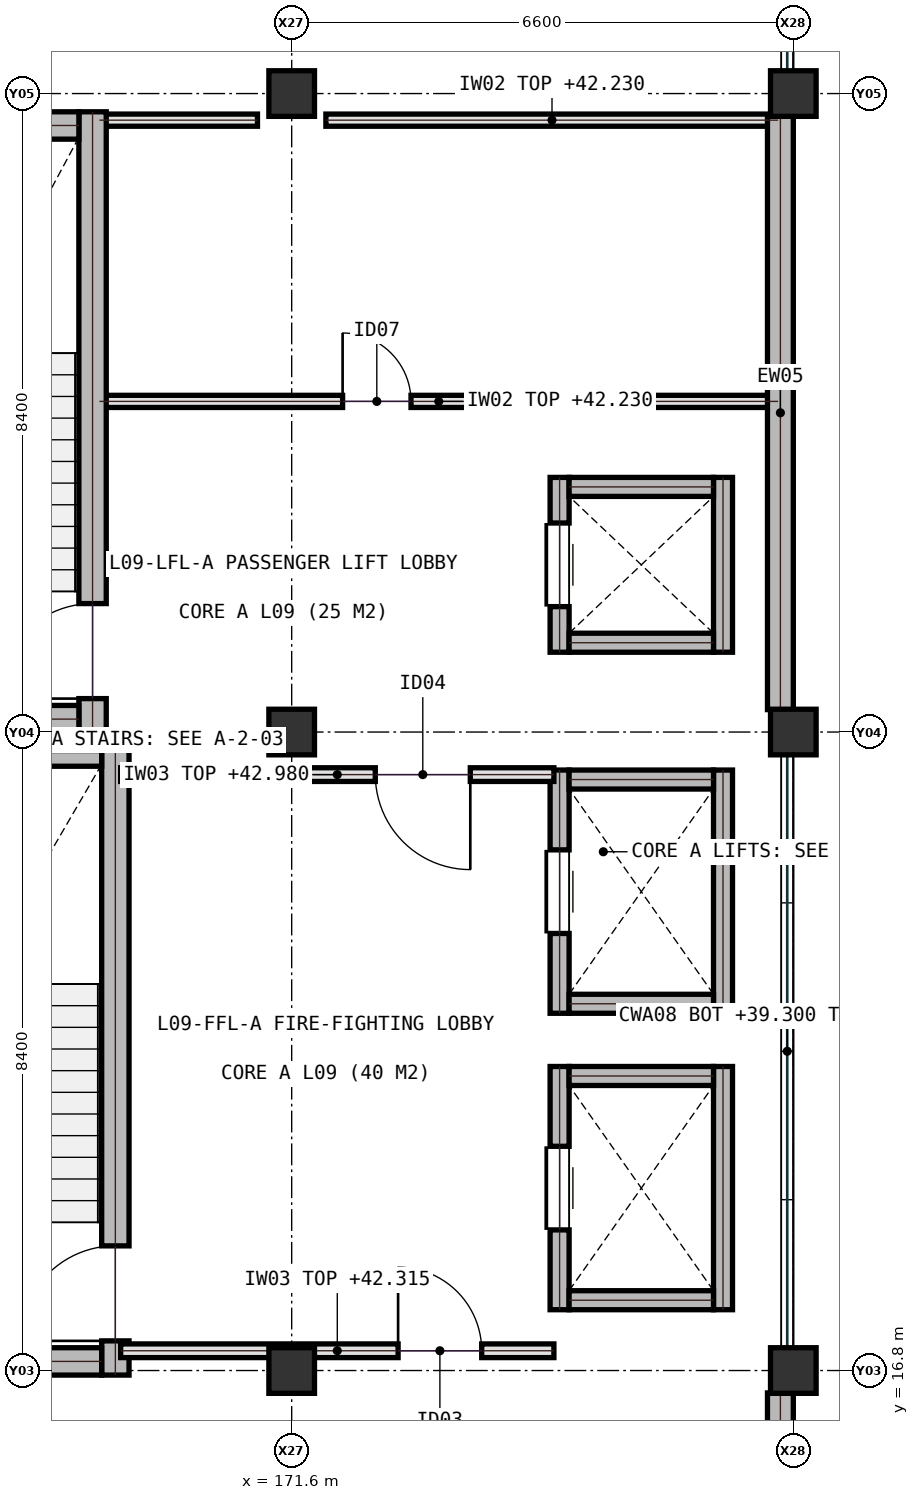
"""IFC4 building model, lengths in metres.
Left out: names, types, materials, properties, quantities, classifications, styles, units other than length and angle.
Written with IfcOpenShell. Run it as: python <this file> out.ifc"""

import sys

from ifc_helpers import new_model, si_unit, direction, frame, frame_2d, origin, origin_2d, place, context, subcontext, project, spatial, rectangle, extrude, element, fill, save


model = new_model("IFC4")
c1 = context("Model", 3, precision=1e-05, world=origin(), true_north=direction((0.0, 1.0)))
c2 = subcontext(c1, "Body", "Model", "MODEL_VIEW")
j1 = project(units=[si_unit("LENGTHUNIT", "METRE"), si_unit("PLANEANGLEUNIT", "RADIAN")], contexts=[c1])
p1 = place(None, origin())
s1 = spatial("IfcSite", under=j1, at=p1, CompositionType="ELEMENT")
p2 = place(p1, origin())
s2 = spatial("IfcBuilding", under=s1, at=p2, CompositionType="ELEMENT")
p3 = place(p2, frame((0.0, 0.0, 39.3)))
s3 = spatial("IfcBuildingStorey", under=s2, at=p3, CompositionType="ELEMENT", Elevation=39.3)
for number, where, z_axis, x_axis in (
    (1, (171.6, 16.8, 0.0), (0.0, 0.0, 1.0), (1.0, 0.0, 0.0)),
    (2, (171.6, 25.2, 0.0), (0.0, 0.0, 1.0), (1.0, 0.0, 0.0)),
    (3, (171.6, 33.6, 0.0), (0.0, 0.0, 1.0), (1.0, 0.0, 0.0)),
    (4, (178.2, 16.8, 0.0), (0.0, 0.0, 1.0), (1.0, 0.0, 0.0)),
    (5, (178.2, 25.2, 0.0), (0.0, 0.0, 1.0), (1.0, 0.0, 0.0)),
    (6, (178.2, 33.6, 0.0), (0.0, 0.0, 1.0), (1.0, 0.0, 0.0)),
):
    element("IfcColumn", number, at=place(p3, frame(where, z_axis=z_axis, x_axis=x_axis)), inside=s3, PredefinedType="COLUMN", context=c2, shape_type="SweptSolid", body=[
        extrude(rectangle(XDim=0.6, YDim=0.6, at=origin_2d()), origin(), (0.0, 0.0, 1.0), 3.9),
    ])
p4 = place(p3, frame((169.07, 29.55, 0.0), z_axis=(0.0, 0.0, 1.0), x_axis=(1.0, 0.0, 0.0)))
e7 = element("IfcWall", 7, at=p4, inside=s3, PredefinedType="PARTITIONING", context=c2, shape_type="SweptSolid", body=[
    extrude(rectangle(XDim=8.93, YDim=0.16, at=frame_2d((4.465, 0.0))), origin(), (0.0, 0.0, 1.0), 2.93),
])
p5 = place(p4, frame((3.2, 0.0, 0.0)))
e8 = element("IfcOpeningElement", 8, at=p5, cuts=e7, PredefinedType="OPENING", context=c2, shape_type="SweptSolid", body=[
    extrude(rectangle(XDim=0.9, YDim=2.1, at=frame_2d((0.45, 1.05))), frame((0.0, 0.09, 0.0), z_axis=(0.0, -1.0, 0.0), x_axis=(1.0, 0.0, 0.0)), (0.0, 0.0, 1.0), 0.18),
])
p6 = place(p3, frame((169.07, 33.25, 0.0), z_axis=(0.0, 0.0, 1.0), x_axis=(1.0, 0.0, 0.0)))
e9 = element("IfcWall", 9, at=p6, inside=s3, PredefinedType="PARTITIONING", context=c2, shape_type="SweptSolid", body=[
    extrude(rectangle(XDim=2.08, YDim=0.16, at=frame_2d((1.04, 0.0))), origin(), (0.0, 0.0, 1.0), 2.93),
])
p7 = place(p3, frame((172.05, 33.25, 0.0), z_axis=(0.0, 0.0, 1.0), x_axis=(1.0, 0.0, 0.0)))
e10 = element("IfcWall", 10, at=p7, inside=s3, PredefinedType="PARTITIONING", context=c2, shape_type="SweptSolid", body=[
    extrude(rectangle(XDim=5.95, YDim=0.16, at=frame_2d((2.975, 0.0))), origin(), (0.0, 0.0, 1.0), 2.93),
])
for number, where, z_axis, x_axis in (
    (11, (178.03, 8.695, 0.0), (0.0, 0.0, 1.0), (0.0, 1.0, 0.0)),
    (12, (178.03, 25.495, 0.0), (0.0, 0.0, 1.0), (0.0, 1.0, 0.0)),
):
    element("IfcWall", number, at=place(p3, frame(where, z_axis=z_axis, x_axis=x_axis)), inside=s3, PredefinedType="SHEAR", context=c2, shape_type="SweptSolid", body=[
        extrude(rectangle(XDim=7.81, YDim=0.34, at=frame_2d((3.905, 0.0))), origin(), (0.0, 0.0, 1.0), 3.68),
    ])
p8 = place(p3, frame((169.28, 16.74, 0.0), z_axis=(0.0, 0.0, 1.0), x_axis=(0.0, 1.0, 0.0)))
e13 = element("IfcWall", 13, at=p8, inside=s3, PredefinedType="SHEAR", context=c2, shape_type="SweptSolid", body=[
    extrude(rectangle(XDim=8.37, YDim=0.36, at=frame_2d((4.185, 0.0))), origin(), (0.0, 0.0, 1.0), 3.68),
])
p9 = place(p8, frame((0.45, 0.0, 0.0)))
e14 = element("IfcOpeningElement", 14, at=p9, cuts=e13, PredefinedType="OPENING", context=c2, shape_type="SweptSolid", body=[
    extrude(rectangle(XDim=1.25, YDim=2.15, at=frame_2d((0.625, 1.075))), frame((0.0, 0.19, 0.0), z_axis=(0.0, -1.0, 0.0), x_axis=(1.0, 0.0, 0.0)), (0.0, 0.0, 1.0), 0.38),
])
for number, where, z_axis, x_axis in (
    (15, (165.6, 24.93, 0.0), (0.0, 0.0, 1.0), (1.0, 0.0, 0.0)),
    (16, (165.6, 16.92, 0.0), (0.0, 0.0, 1.0), (1.0, 0.0, 0.0)),
):
    element("IfcWall", number, at=place(p3, frame(where, z_axis=z_axis, x_axis=x_axis)), inside=s3, PredefinedType="SHEAR", context=c2, shape_type="SweptSolid", body=[
        extrude(rectangle(XDim=3.5, YDim=0.36, at=frame_2d((1.75, 0.0))), origin(), (0.0, 0.0, 1.0), 3.68),
    ])
p10 = place(p3, frame((168.98, 25.19, 0.0), z_axis=(0.0, 0.0, 1.0), x_axis=(0.0, 1.0, 0.0)))
e17 = element("IfcWall", 17, at=p10, inside=s3, PredefinedType="SHEAR", context=c2, shape_type="SweptSolid", body=[
    extrude(rectangle(XDim=8.17, YDim=0.36, at=frame_2d((4.085, 0.0))), origin(), (0.0, 0.0, 1.0), 3.68),
])
p11 = place(p10, frame((0.45, 0.0, 0.0)))
e18 = element("IfcOpeningElement", 18, at=p11, cuts=e17, PredefinedType="OPENING", context=c2, shape_type="SweptSolid", body=[
    extrude(rectangle(XDim=1.25, YDim=2.15, at=frame_2d((0.625, 1.075))), frame((0.0, 0.19, 0.0), z_axis=(0.0, -1.0, 0.0), x_axis=(1.0, 0.0, 0.0)), (0.0, 0.0, 1.0), 0.38),
])
for number, where, z_axis, x_axis in (
    (19, (165.6, 33.18, 0.0), (0.0, 0.0, 1.0), (1.0, 0.0, 0.0)),
    (20, (165.6, 25.37, 0.0), (0.0, 0.0, 1.0), (1.0, 0.0, 0.0)),
):
    element("IfcWall", number, at=place(p3, frame(where, z_axis=z_axis, x_axis=x_axis)), inside=s3, PredefinedType="SHEAR", context=c2, shape_type="SweptSolid", body=[
        extrude(rectangle(XDim=3.2, YDim=0.36, at=frame_2d((1.6, 0.0))), origin(), (0.0, 0.0, 1.0), 3.68),
    ])
p12 = place(p3, frame((175.125, 17.6, 0.0), z_axis=(0.0, 0.0, 1.0), x_axis=(0.0, 1.0, 0.0)))
e21 = element("IfcWall", 21, at=p12, inside=s3, PredefinedType="SHEAR", context=c2, shape_type="SweptSolid", body=[
    extrude(rectangle(XDim=3.2, YDim=0.25, at=frame_2d((1.6, 0.0))), origin(), (0.0, 0.0, 1.0), 3.68),
])
p13 = place(p12, frame((1.05, 0.0, 0.0)))
e22 = element("IfcOpeningElement", 22, at=p13, cuts=e21, PredefinedType="OPENING", context=c2, shape_type="SweptSolid", body=[
    extrude(rectangle(XDim=1.1, YDim=2.15, at=frame_2d((0.55, 1.075))), frame((0.0, 0.135, 0.0), z_axis=(0.0, -1.0, 0.0), x_axis=(1.0, 0.0, 0.0)), (0.0, 0.0, 1.0), 0.27),
])
p14 = place(p3, frame((177.275, 17.6, 0.0), z_axis=(0.0, 0.0, 1.0), x_axis=(0.0, 1.0, 0.0)))
e23 = element("IfcWall", 23, at=p14, inside=s3, PredefinedType="SHEAR", context=c2, shape_type="SweptSolid", body=[
    extrude(rectangle(XDim=3.2, YDim=0.25, at=frame_2d((1.6, 0.0))), origin(), (0.0, 0.0, 1.0), 3.68),
])
for number, where, z_axis, x_axis in (
    (24, (175.25, 17.725, 0.0), (0.0, 0.0, 1.0), (1.0, 0.0, 0.0)),
    (25, (175.25, 20.675, 0.0), (0.0, 0.0, 1.0), (1.0, 0.0, 0.0)),
):
    element("IfcWall", number, at=place(p3, frame(where, z_axis=z_axis, x_axis=x_axis)), inside=s3, PredefinedType="SHEAR", context=c2, shape_type="SweptSolid", body=[
        extrude(rectangle(XDim=1.9, YDim=0.25, at=frame_2d((0.95, 0.0))), origin(), (0.0, 0.0, 1.0), 3.68),
    ])
p15 = place(p3, frame((175.125, 21.5, 0.0), z_axis=(0.0, 0.0, 1.0), x_axis=(0.0, 1.0, 0.0)))
e26 = element("IfcWall", 26, at=p15, inside=s3, PredefinedType="SHEAR", context=c2, shape_type="SweptSolid", body=[
    extrude(rectangle(XDim=3.2, YDim=0.25, at=frame_2d((1.6, 0.0))), origin(), (0.0, 0.0, 1.0), 3.68),
])
p16 = place(p15, frame((1.05, 0.0, 0.0)))
e27 = element("IfcOpeningElement", 27, at=p16, cuts=e26, PredefinedType="OPENING", context=c2, shape_type="SweptSolid", body=[
    extrude(rectangle(XDim=1.1, YDim=2.15, at=frame_2d((0.55, 1.075))), frame((0.0, 0.135, 0.0), z_axis=(0.0, -1.0, 0.0), x_axis=(1.0, 0.0, 0.0)), (0.0, 0.0, 1.0), 0.27),
])
p17 = place(p3, frame((177.275, 21.5, 0.0), z_axis=(0.0, 0.0, 1.0), x_axis=(0.0, 1.0, 0.0)))
e28 = element("IfcWall", 28, at=p17, inside=s3, PredefinedType="SHEAR", context=c2, shape_type="SweptSolid", body=[
    extrude(rectangle(XDim=3.2, YDim=0.25, at=frame_2d((1.6, 0.0))), origin(), (0.0, 0.0, 1.0), 3.68),
])
for number, where, z_axis, x_axis in (
    (29, (175.25, 21.625, 0.0), (0.0, 0.0, 1.0), (1.0, 0.0, 0.0)),
    (30, (175.25, 24.575, 0.0), (0.0, 0.0, 1.0), (1.0, 0.0, 0.0)),
):
    element("IfcWall", number, at=place(p3, frame(where, z_axis=z_axis, x_axis=x_axis)), inside=s3, PredefinedType="SHEAR", context=c2, shape_type="SweptSolid", body=[
        extrude(rectangle(XDim=1.9, YDim=0.25, at=frame_2d((0.95, 0.0))), origin(), (0.0, 0.0, 1.0), 3.68),
    ])
p18 = place(p3, frame((175.125, 26.25, 0.0), z_axis=(0.0, 0.0, 1.0), x_axis=(0.0, 1.0, 0.0)))
e31 = element("IfcWall", 31, at=p18, inside=s3, PredefinedType="SHEAR", context=c2, shape_type="SweptSolid", body=[
    extrude(rectangle(XDim=2.3, YDim=0.25, at=frame_2d((1.15, 0.0))), origin(), (0.0, 0.0, 1.0), 3.68),
])
p19 = place(p18, frame((0.6, 0.0, 0.0)))
e32 = element("IfcOpeningElement", 32, at=p19, cuts=e31, PredefinedType="OPENING", context=c2, shape_type="SweptSolid", body=[
    extrude(rectangle(XDim=1.1, YDim=2.15, at=frame_2d((0.55, 1.075))), frame((0.0, 0.135, 0.0), z_axis=(0.0, -1.0, 0.0), x_axis=(1.0, 0.0, 0.0)), (0.0, 0.0, 1.0), 0.27),
])
p20 = place(p3, frame((177.275, 26.25, 0.0), z_axis=(0.0, 0.0, 1.0), x_axis=(0.0, 1.0, 0.0)))
e33 = element("IfcWall", 33, at=p20, inside=s3, PredefinedType="SHEAR", context=c2, shape_type="SweptSolid", body=[
    extrude(rectangle(XDim=2.3, YDim=0.25, at=frame_2d((1.15, 0.0))), origin(), (0.0, 0.0, 1.0), 3.68),
])
for number, where, z_axis, x_axis in (
    (34, (175.25, 26.375, 0.0), (0.0, 0.0, 1.0), (1.0, 0.0, 0.0)),
    (35, (175.25, 28.425, 0.0), (0.0, 0.0, 1.0), (1.0, 0.0, 0.0)),
):
    element("IfcWall", number, at=place(p3, frame(where, z_axis=z_axis, x_axis=x_axis)), inside=s3, PredefinedType="SHEAR", context=c2, shape_type="SweptSolid", body=[
        extrude(rectangle(XDim=1.9, YDim=0.25, at=frame_2d((0.95, 0.0))), origin(), (0.0, 0.0, 1.0), 3.68),
    ])
p21 = place(p3, frame((169.35, 24.64, 0.0), z_axis=(0.0, 0.0, 1.0), x_axis=(1.0, 0.0, 0.0)))
e36 = element("IfcWall", 36, at=p21, inside=s3, PredefinedType="SOLIDWALL", context=c2, shape_type="SweptSolid", body=[
    extrude(rectangle(XDim=5.7, YDim=0.18, at=frame_2d((2.85, 0.0))), origin(), (0.0, 0.0, 1.0), 3.68),
])
p22 = place(p21, frame((3.35, 0.0, 0.0)))
e37 = element("IfcOpeningElement", 37, at=p22, cuts=e36, PredefinedType="OPENING", context=c2, shape_type="SweptSolid", body=[
    extrude(rectangle(XDim=1.25, YDim=2.15, at=frame_2d((0.625, 1.075))), frame((0.0, 0.1, 0.0), z_axis=(0.0, -1.0, 0.0), x_axis=(1.0, 0.0, 0.0)), (0.0, 0.0, 1.0), 0.2),
])
p23 = place(p3, frame((169.35, 17.06, 0.0), z_axis=(0.0, 0.0, 1.0), x_axis=(1.0, 0.0, 0.0)))
e38 = element("IfcWall", 38, at=p23, inside=s3, PredefinedType="SOLIDWALL", context=c2, shape_type="SweptSolid", body=[
    extrude(rectangle(XDim=5.7, YDim=0.18, at=frame_2d((2.85, 0.0))), origin(), (0.0, 0.0, 1.0), 3.015),
])
p24 = place(p23, frame((3.65, 0.0, 0.0)))
e39 = element("IfcOpeningElement", 39, at=p24, cuts=e38, PredefinedType="OPENING", context=c2, shape_type="SweptSolid", body=[
    extrude(rectangle(XDim=1.1, YDim=2.15, at=frame_2d((0.55, 1.075))), frame((0.0, 0.1, 0.0), z_axis=(0.0, -1.0, 0.0), x_axis=(1.0, 0.0, 0.0)), (0.0, 0.0, 1.0), 0.2),
])
p25 = place(p5, origin())
e40 = element("IfcDoor", 40, at=p25, inside=s3, OperationType="SINGLE_SWING_LEFT", PredefinedType="DOOR", context=c2, shape_type="SweptSolid", body=[
    extrude(rectangle(XDim=0.9, YDim=2.1, at=frame_2d((0.45, 1.05))), frame((0.0, 0.025, 0.0), z_axis=(0.0, -1.0, 0.0), x_axis=(1.0, 0.0, 0.0)), (0.0, 0.0, 1.0), 0.05),
])
fill(e8, e40)
p26 = place(p9, origin())
e41 = element("IfcDoor", 41, at=p26, inside=s3, OperationType="SINGLE_SWING_LEFT", PredefinedType="DOOR", context=c2, shape_type="SweptSolid", body=[
    extrude(rectangle(XDim=1.25, YDim=2.15, at=frame_2d((0.625, 1.075))), frame((0.0, 0.025, 0.0), z_axis=(0.0, -1.0, 0.0), x_axis=(1.0, 0.0, 0.0)), (0.0, 0.0, 1.0), 0.05),
])
fill(e14, e41)
p27 = place(p11, origin())
e42 = element("IfcDoor", 42, at=p27, inside=s3, OperationType="SINGLE_SWING_LEFT", PredefinedType="DOOR", context=c2, shape_type="SweptSolid", body=[
    extrude(rectangle(XDim=1.25, YDim=2.15, at=frame_2d((0.625, 1.075))), frame((0.0, 0.025, 0.0), z_axis=(0.0, -1.0, 0.0), x_axis=(1.0, 0.0, 0.0)), (0.0, 0.0, 1.0), 0.05),
])
fill(e18, e42)
p28 = place(p13, origin())
e43 = element("IfcDoor", 43, at=p28, inside=s3, OperationType="SLIDING_TO_LEFT", PredefinedType="DOOR", context=c2, shape_type="SweptSolid", body=[
    extrude(rectangle(XDim=1.1, YDim=2.15, at=frame_2d((0.55, 1.075))), frame((0.0, 0.025, 0.0), z_axis=(0.0, -1.0, 0.0), x_axis=(1.0, 0.0, 0.0)), (0.0, 0.0, 1.0), 0.05),
])
fill(e22, e43)
p29 = place(p16, origin())
e44 = element("IfcDoor", 44, at=p29, inside=s3, OperationType="SLIDING_TO_LEFT", PredefinedType="DOOR", context=c2, shape_type="SweptSolid", body=[
    extrude(rectangle(XDim=1.1, YDim=2.15, at=frame_2d((0.55, 1.075))), frame((0.0, 0.025, 0.0), z_axis=(0.0, -1.0, 0.0), x_axis=(1.0, 0.0, 0.0)), (0.0, 0.0, 1.0), 0.05),
])
fill(e27, e44)
p30 = place(p19, origin())
e45 = element("IfcDoor", 45, at=p30, inside=s3, OperationType="SLIDING_TO_LEFT", PredefinedType="DOOR", context=c2, shape_type="SweptSolid", body=[
    extrude(rectangle(XDim=1.1, YDim=2.15, at=frame_2d((0.55, 1.075))), frame((0.0, 0.025, 0.0), z_axis=(0.0, -1.0, 0.0), x_axis=(1.0, 0.0, 0.0)), (0.0, 0.0, 1.0), 0.05),
])
fill(e32, e45)
p31 = place(p22, frame((1.25, 0.0, 0.0), z_axis=(0.0, 0.0, 1.0), x_axis=(-1.0, 0.0, 0.0)))
e46 = element("IfcDoor", 46, at=p31, inside=s3, OperationType="SINGLE_SWING_RIGHT", PredefinedType="DOOR", context=c2, shape_type="SweptSolid", body=[
    extrude(rectangle(XDim=1.25, YDim=2.15, at=frame_2d((0.625, 1.075))), frame((0.0, 0.025, 0.0), z_axis=(0.0, -1.0, 0.0), x_axis=(1.0, 0.0, 0.0)), (0.0, 0.0, 1.0), 0.05),
])
fill(e37, e46)
p32 = place(p24, origin())
e47 = element("IfcDoor", 47, at=p32, inside=s3, OperationType="SINGLE_SWING_LEFT", PredefinedType="DOOR", context=c2, shape_type="SweptSolid", body=[
    extrude(rectangle(XDim=1.1, YDim=2.15, at=frame_2d((0.55, 1.075))), frame((0.0, 0.025, 0.0), z_axis=(0.0, -1.0, 0.0), x_axis=(1.0, 0.0, 0.0)), (0.0, 0.0, 1.0), 0.05),
])
fill(e39, e47)
save(model, sys.argv[1])
